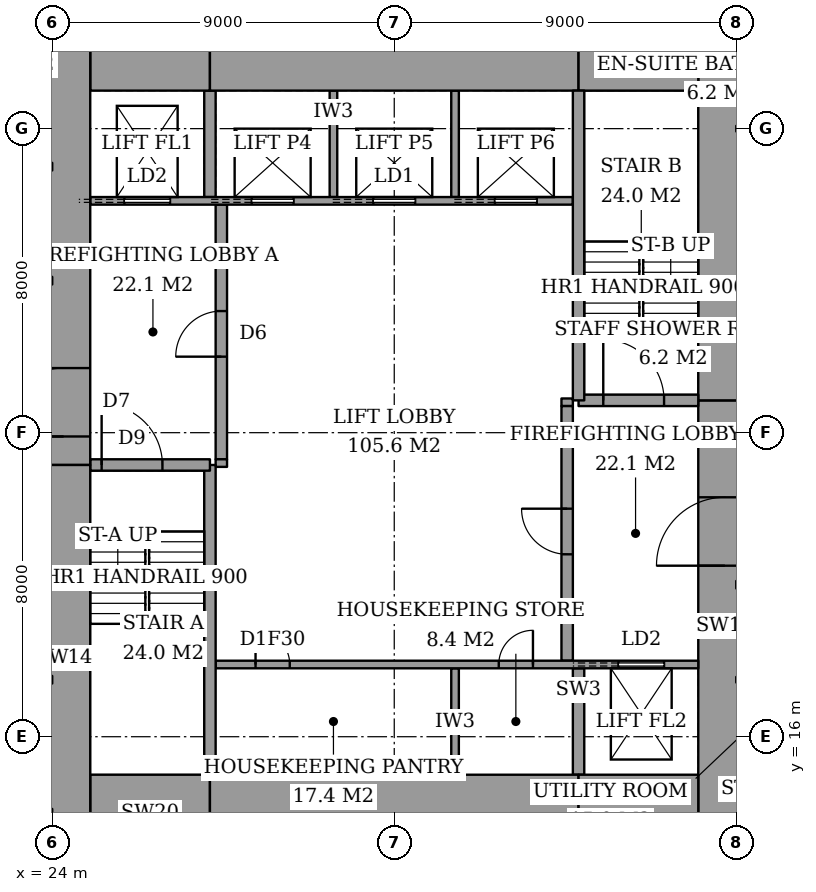
"""IFC4 building model, lengths in metres.
Left out: names, types, materials, properties, quantities, classifications, styles, units other than length and angle.
Written with IfcOpenShell. Run it as: python <this file> out.ifc"""

import sys

from ifc_helpers import new_model, si_unit, direction, frame, frame_2d, origin, place, context, subcontext, project, spatial, rectangle, extrude, element, fill, save


model = new_model("IFC4")
c1 = context("Model", 3, precision=1e-05, world=origin(), true_north=direction((0.0, 1.0)))
c2 = subcontext(c1, "Body", "Model", "MODEL_VIEW")
j1 = project(units=[si_unit("LENGTHUNIT", "METRE"), si_unit("PLANEANGLEUNIT", "RADIAN")], contexts=[c1])
p1 = place(None, origin())
s1 = spatial("IfcSite", under=j1, at=p1, CompositionType="ELEMENT")
p2 = place(p1, origin())
s2 = spatial("IfcBuilding", under=s1, at=p2, CompositionType="ELEMENT")
p3 = place(p2, frame((0.0, 0.0, 218.2)))
s3 = spatial("IfcBuildingStorey", under=s2, at=p3, CompositionType="ELEMENT", Elevation=218.2)
p4 = place(p3, frame((25.0, 14.0, 0.0), z_axis=(0.0, 0.0, 1.0), x_axis=(1.0, 0.0, 0.0)))
e1 = element("IfcWall", 1, at=p4, inside=s3, PredefinedType="SHEAR", context=c2, shape_type="SweptSolid", body=[
    extrude(rectangle(XDim=3.15, YDim=2.0, at=frame_2d((1.575, 0.0))), origin(), (0.0, 0.0, 1.0), 3.6),
])
p5 = place(p3, frame((28.15, 14.0, 0.0), z_axis=(0.0, 0.0, 1.0), x_axis=(1.0, 0.0, 0.0)))
e2 = element("IfcWall", 2, at=p5, inside=s3, PredefinedType="SHEAR", context=c2, shape_type="SweptSolid", body=[
    extrude(rectangle(XDim=9.7, YDim=2.0, at=frame_2d((4.85, 0.0))), origin(), (0.0, 0.0, 1.0), 3.6),
])
for number, where, z_axis, x_axis in (
    (3, (37.85, 14.0, 0.0), (0.0, 0.0, 1.0), (1.0, 0.0, 0.0)),
    (4, (25.0, 34.0, 0.0), (0.0, 0.0, 1.0), (1.0, 0.0, 0.0)),
):
    element("IfcWall", number, at=place(p3, frame(where, z_axis=z_axis, x_axis=x_axis)), inside=s3, PredefinedType="SHEAR", context=c2, shape_type="SweptSolid", body=[
        extrude(rectangle(XDim=3.15, YDim=2.0, at=frame_2d((1.575, 0.0))), origin(), (0.0, 0.0, 1.0), 3.6),
    ])
p6 = place(p3, frame((28.15, 34.0, 0.0), z_axis=(0.0, 0.0, 1.0), x_axis=(1.0, 0.0, 0.0)))
e5 = element("IfcWall", 5, at=p6, inside=s3, PredefinedType="SHEAR", context=c2, shape_type="SweptSolid", body=[
    extrude(rectangle(XDim=9.7, YDim=2.0, at=frame_2d((4.85, 0.0))), origin(), (0.0, 0.0, 1.0), 3.6),
])
p7 = place(p3, frame((37.85, 34.0, 0.0), z_axis=(0.0, 0.0, 1.0), x_axis=(1.0, 0.0, 0.0)))
e6 = element("IfcWall", 6, at=p7, inside=s3, PredefinedType="SHEAR", context=c2, shape_type="SweptSolid", body=[
    extrude(rectangle(XDim=3.15, YDim=2.0, at=frame_2d((1.575, 0.0))), origin(), (0.0, 0.0, 1.0), 3.6),
])
p8 = place(p3, frame((24.3, 13.0, 0.0), z_axis=(0.0, 0.0, 1.0), x_axis=(0.0, 1.0, 0.0)))
e7 = element("IfcWall", 7, at=p8, inside=s3, PredefinedType="SHEAR", context=c2, shape_type="SweptSolid", body=[
    extrude(rectangle(XDim=10.15, YDim=1.4, at=frame_2d((5.075, 0.0))), origin(), (0.0, 0.0, 1.0), 3.6),
])
p9 = place(p3, frame((24.3, 23.15, 0.0), z_axis=(0.0, 0.0, 1.0), x_axis=(0.0, 1.0, 0.0)))
e8 = element("IfcWall", 8, at=p9, inside=s3, PredefinedType="SHEAR", context=c2, shape_type="SweptSolid", body=[
    extrude(rectangle(XDim=11.85, YDim=1.4, at=frame_2d((5.925, 0.0))), origin(), (0.0, 0.0, 1.0), 3.6),
])
p10 = place(p9, frame((0.75, 0.0, 0.0)))
e9 = element("IfcOpeningElement", 9, at=p10, cuts=e8, PredefinedType="OPENING", context=c2, shape_type="SweptSolid", body=[
    extrude(rectangle(XDim=1.8, YDim=2.4, at=frame_2d((0.9, 1.2))), frame((0.0, 0.71, 0.0), z_axis=(0.0, -1.0, 0.0), x_axis=(1.0, 0.0, 0.0)), (0.0, 0.0, 1.0), 1.42),
])
p11 = place(p3, frame((41.7, 13.0, 0.0), z_axis=(0.0, 0.0, 1.0), x_axis=(0.0, 1.0, 0.0)))
e10 = element("IfcWall", 10, at=p11, inside=s3, PredefinedType="SHEAR", context=c2, shape_type="SweptSolid", body=[
    extrude(rectangle(XDim=11.85, YDim=1.4, at=frame_2d((5.925, 0.0))), origin(), (0.0, 0.0, 1.0), 3.6),
])
p12 = place(p11, frame((7.5, 0.0, 0.0)))
e11 = element("IfcOpeningElement", 11, at=p12, cuts=e10, PredefinedType="OPENING", context=c2, shape_type="SweptSolid", body=[
    extrude(rectangle(XDim=1.8, YDim=2.4, at=frame_2d((0.9, 1.2))), frame((0.0, 0.71, 0.0), z_axis=(0.0, -1.0, 0.0), x_axis=(1.0, 0.0, 0.0)), (0.0, 0.0, 1.0), 1.42),
])
p13 = place(p3, frame((41.7, 24.85, 0.0), z_axis=(0.0, 0.0, 1.0), x_axis=(0.0, 1.0, 0.0)))
e12 = element("IfcWall", 12, at=p13, inside=s3, PredefinedType="SHEAR", context=c2, shape_type="SweptSolid", body=[
    extrude(rectangle(XDim=10.15, YDim=1.4, at=frame_2d((5.075, 0.0))), origin(), (0.0, 0.0, 1.0), 3.6),
])
p14 = place(p3, frame((28.15, 15.0, 0.0), z_axis=(0.0, 0.0, 1.0), x_axis=(0.0, 1.0, 0.0)))
e13 = element("IfcWall", 13, at=p14, inside=s3, PredefinedType="SHEAR", context=c2, shape_type="SweptSolid", body=[
    extrude(rectangle(XDim=8.15, YDim=0.3, at=frame_2d((4.075, 0.0))), origin(), (0.0, 0.0, 1.0), 3.6),
])
p15 = place(p3, frame((25.0, 23.15, 0.0), z_axis=(0.0, 0.0, 1.0), x_axis=(1.0, 0.0, 0.0)))
e14 = element("IfcWall", 14, at=p15, inside=s3, PredefinedType="SHEAR", context=c2, shape_type="SweptSolid", body=[
    extrude(rectangle(XDim=3.15, YDim=0.3, at=frame_2d((1.575, 0.0))), origin(), (0.0, 0.0, 1.0), 3.6),
])
p16 = place(p15, frame((0.3, 0.0, 0.0)))
e15 = element("IfcOpeningElement", 15, at=p16, cuts=e14, PredefinedType="OPENING", context=c2, shape_type="SweptSolid", body=[
    extrude(rectangle(XDim=1.6, YDim=2.1, at=frame_2d((0.8, 1.05))), frame((0.0, 0.16, 0.0), z_axis=(0.0, -1.0, 0.0), x_axis=(1.0, 0.0, 0.0)), (0.0, 0.0, 1.0), 0.32),
])
p17 = place(p3, frame((37.85, 24.85, 0.0), z_axis=(0.0, 0.0, 1.0), x_axis=(0.0, 1.0, 0.0)))
e16 = element("IfcWall", 16, at=p17, inside=s3, PredefinedType="SHEAR", context=c2, shape_type="SweptSolid", body=[
    extrude(rectangle(XDim=8.15, YDim=0.3, at=frame_2d((4.075, 0.0))), origin(), (0.0, 0.0, 1.0), 3.6),
])
p18 = place(p3, frame((37.85, 24.85, 0.0), z_axis=(0.0, 0.0, 1.0), x_axis=(1.0, 0.0, 0.0)))
e17 = element("IfcWall", 17, at=p18, inside=s3, PredefinedType="SHEAR", context=c2, shape_type="SweptSolid", body=[
    extrude(rectangle(XDim=3.15, YDim=0.3, at=frame_2d((1.575, 0.0))), origin(), (0.0, 0.0, 1.0), 3.6),
])
p19 = place(p18, frame((0.65, 0.0, 0.0)))
e18 = element("IfcOpeningElement", 18, at=p19, cuts=e17, PredefinedType="OPENING", context=c2, shape_type="SweptSolid", body=[
    extrude(rectangle(XDim=1.6, YDim=2.1, at=frame_2d((0.8, 1.05))), frame((0.0, 0.16, 0.0), z_axis=(0.0, -1.0, 0.0), x_axis=(1.0, 0.0, 0.0)), (0.0, 0.0, 1.0), 0.32),
])
p20 = place(p3, frame((28.45, 23.3, 0.0), z_axis=(0.0, 0.0, 1.0), x_axis=(0.0, 1.0, 0.0)))
e19 = element("IfcWall", 19, at=p20, inside=s3, PredefinedType="PARTITIONING", context=c2, shape_type="SweptSolid", body=[
    extrude(rectangle(XDim=6.7, YDim=0.3, at=frame_2d((3.35, 0.0))), origin(), (0.0, 0.0, 1.0), 3.6),
])
p21 = place(p20, frame((2.7, 0.0, 0.0)))
e20 = element("IfcOpeningElement", 20, at=p21, cuts=e19, PredefinedType="OPENING", context=c2, shape_type="SweptSolid", body=[
    extrude(rectangle(XDim=1.2, YDim=2.1, at=frame_2d((0.6, 1.05))), frame((0.0, 0.16, 0.0), z_axis=(0.0, -1.0, 0.0), x_axis=(1.0, 0.0, 0.0)), (0.0, 0.0, 1.0), 0.32),
])
p22 = place(p3, frame((37.55, 18.0, 0.0), z_axis=(0.0, 0.0, 1.0), x_axis=(0.0, 1.0, 0.0)))
e21 = element("IfcWall", 21, at=p22, inside=s3, PredefinedType="PARTITIONING", context=c2, shape_type="SweptSolid", body=[
    extrude(rectangle(XDim=6.7, YDim=0.3, at=frame_2d((3.35, 0.0))), origin(), (0.0, 0.0, 1.0), 3.6),
])
p23 = place(p22, frame((2.8, 0.0, 0.0)))
e22 = element("IfcOpeningElement", 22, at=p23, cuts=e21, PredefinedType="OPENING", context=c2, shape_type="SweptSolid", body=[
    extrude(rectangle(XDim=1.2, YDim=2.1, at=frame_2d((0.6, 1.05))), frame((0.0, 0.16, 0.0), z_axis=(0.0, -1.0, 0.0), x_axis=(1.0, 0.0, 0.0)), (0.0, 0.0, 1.0), 0.32),
])
p24 = place(p3, frame((28.3, 17.9, 0.0), z_axis=(0.0, 0.0, 1.0), x_axis=(1.0, 0.0, 0.0)))
e23 = element("IfcWall", 23, at=p24, inside=s3, PredefinedType="PARTITIONING", context=c2, shape_type="SweptSolid", body=[
    extrude(rectangle(XDim=12.7, YDim=0.2, at=frame_2d((6.35, 0.0))), origin(), (0.0, 0.0, 1.0), 3.6),
])
p25 = place(p24, frame((1.05, 0.0, 0.0)))
e24 = element("IfcOpeningElement", 24, at=p25, cuts=e23, PredefinedType="OPENING", context=c2, shape_type="SweptSolid", body=[
    extrude(rectangle(XDim=0.9, YDim=2.1, at=frame_2d((0.45, 1.05))), frame((0.0, 0.11, 0.0), z_axis=(0.0, -1.0, 0.0), x_axis=(1.0, 0.0, 0.0)), (0.0, 0.0, 1.0), 0.22),
])
p26 = place(p24, frame((7.45, 0.0, 0.0)))
e25 = element("IfcOpeningElement", 25, at=p26, cuts=e23, PredefinedType="OPENING", context=c2, shape_type="SweptSolid", body=[
    extrude(rectangle(XDim=0.9, YDim=2.1, at=frame_2d((0.45, 1.05))), frame((0.0, 0.11, 0.0), z_axis=(0.0, -1.0, 0.0), x_axis=(1.0, 0.0, 0.0)), (0.0, 0.0, 1.0), 0.22),
])
p27 = place(p24, frame((10.6, 0.0, 0.0)))
e26 = element("IfcOpeningElement", 26, at=p27, cuts=e23, PredefinedType="OPENING", context=c2, shape_type="SweptSolid", body=[
    extrude(rectangle(XDim=1.2, YDim=2.1, at=frame_2d((0.6, 1.05))), frame((0.0, 0.11, 0.0), z_axis=(0.0, -1.0, 0.0), x_axis=(1.0, 0.0, 0.0)), (0.0, 0.0, 1.0), 0.22),
])
p28 = place(p3, frame((25.0, 30.1, 0.0), z_axis=(0.0, 0.0, 1.0), x_axis=(1.0, 0.0, 0.0)))
e27 = element("IfcWall", 27, at=p28, inside=s3, PredefinedType="PARTITIONING", context=c2, shape_type="SweptSolid", body=[
    extrude(rectangle(XDim=12.7, YDim=0.2, at=frame_2d((6.35, 0.0))), origin(), (0.0, 0.0, 1.0), 3.6),
])
p29 = place(p28, frame((4.25, 0.0, 0.0)))
e28 = element("IfcOpeningElement", 28, at=p29, cuts=e27, PredefinedType="OPENING", context=c2, shape_type="SweptSolid", body=[
    extrude(rectangle(XDim=1.1, YDim=2.1, at=frame_2d((0.55, 1.05))), frame((0.0, 0.11, 0.0), z_axis=(0.0, -1.0, 0.0), x_axis=(1.0, 0.0, 0.0)), (0.0, 0.0, 1.0), 0.22),
])
p30 = place(p28, frame((7.45, 0.0, 0.0)))
e29 = element("IfcOpeningElement", 29, at=p30, cuts=e27, PredefinedType="OPENING", context=c2, shape_type="SweptSolid", body=[
    extrude(rectangle(XDim=1.1, YDim=2.1, at=frame_2d((0.55, 1.05))), frame((0.0, 0.11, 0.0), z_axis=(0.0, -1.0, 0.0), x_axis=(1.0, 0.0, 0.0)), (0.0, 0.0, 1.0), 0.22),
])
p31 = place(p28, frame((10.65, 0.0, 0.0)))
e30 = element("IfcOpeningElement", 30, at=p31, cuts=e27, PredefinedType="OPENING", context=c2, shape_type="SweptSolid", body=[
    extrude(rectangle(XDim=1.1, YDim=2.1, at=frame_2d((0.55, 1.05))), frame((0.0, 0.11, 0.0), z_axis=(0.0, -1.0, 0.0), x_axis=(1.0, 0.0, 0.0)), (0.0, 0.0, 1.0), 0.22),
])
p32 = place(p28, frame((0.9, 0.0, 0.0)))
e31 = element("IfcOpeningElement", 31, at=p32, cuts=e27, PredefinedType="OPENING", context=c2, shape_type="SweptSolid", body=[
    extrude(rectangle(XDim=1.2, YDim=2.1, at=frame_2d((0.6, 1.05))), frame((0.0, 0.11, 0.0), z_axis=(0.0, -1.0, 0.0), x_axis=(1.0, 0.0, 0.0)), (0.0, 0.0, 1.0), 0.22),
])
p33 = place(p3, frame((34.6, 15.0, 0.0), z_axis=(0.0, 0.0, 1.0), x_axis=(0.0, 1.0, 0.0)))
e32 = element("IfcWall", 32, at=p33, inside=s3, PredefinedType="PARTITIONING", context=c2, shape_type="SweptSolid", body=[
    extrude(rectangle(XDim=2.8, YDim=0.2, at=frame_2d((1.4, 0.0))), origin(), (0.0, 0.0, 1.0), 3.6),
])
p34 = place(p3, frame((37.85, 15.0, 0.0), z_axis=(0.0, 0.0, 1.0), x_axis=(0.0, 1.0, 0.0)))
e33 = element("IfcWall", 33, at=p34, inside=s3, PredefinedType="SHEAR", context=c2, shape_type="SweptSolid", body=[
    extrude(rectangle(XDim=2.8, YDim=0.3, at=frame_2d((1.4, 0.0))), origin(), (0.0, 0.0, 1.0), 3.6),
])
for number, where, z_axis, x_axis in (
    (34, (31.4, 30.2, 0.0), (0.0, 0.0, 1.0), (0.0, 1.0, 0.0)),
    (35, (34.6, 30.2, 0.0), (0.0, 0.0, 1.0), (0.0, 1.0, 0.0)),
):
    element("IfcWall", number, at=place(p3, frame(where, z_axis=z_axis, x_axis=x_axis)), inside=s3, PredefinedType="PARTITIONING", context=c2, shape_type="SweptSolid", body=[
        extrude(rectangle(XDim=2.8, YDim=0.2, at=frame_2d((1.4, 0.0))), origin(), (0.0, 0.0, 1.0), 3.6),
    ])
p35 = place(p3, frame((28.15, 30.2, 0.0), z_axis=(0.0, 0.0, 1.0), x_axis=(0.0, 1.0, 0.0)))
e36 = element("IfcWall", 36, at=p35, inside=s3, PredefinedType="SHEAR", context=c2, shape_type="SweptSolid", body=[
    extrude(rectangle(XDim=2.8, YDim=0.3, at=frame_2d((1.4, 0.0))), origin(), (0.0, 0.0, 1.0), 3.6),
])
for number, where, z_axis, x_axis in (
    (37, (28.3, 23.2, 0.0), (0.0, 0.0, 1.0), (1.0, 0.0, 0.0)),
    (38, (37.4, 24.8, 0.0), (0.0, 0.0, 1.0), (1.0, 0.0, 0.0)),
):
    element("IfcWall", number, at=place(p3, frame(where, z_axis=z_axis, x_axis=x_axis)), inside=s3, PredefinedType="PARTITIONING", context=c2, shape_type="SweptSolid", body=[
        extrude(rectangle(XDim=0.3, YDim=0.2, at=frame_2d((0.15, 0.0))), origin(), (0.0, 0.0, 1.0), 3.6),
    ])
p36 = place(p16, origin())
e39 = element("IfcDoor", 39, at=p36, inside=s3, OperationType="DOUBLE_DOOR_SINGLE_SWING", PredefinedType="DOOR", context=c2, shape_type="SweptSolid", body=[
    extrude(rectangle(XDim=1.6, YDim=2.1, at=frame_2d((0.8, 1.05))), frame((0.0, 0.025, 0.0), z_axis=(0.0, -1.0, 0.0), x_axis=(1.0, 0.0, 0.0)), (0.0, 0.0, 1.0), 0.05),
])
fill(e15, e39)
p37 = place(p19, origin())
e40 = element("IfcDoor", 40, at=p37, inside=s3, OperationType="DOUBLE_DOOR_SINGLE_SWING", PredefinedType="DOOR", context=c2, shape_type="SweptSolid", body=[
    extrude(rectangle(XDim=1.6, YDim=2.1, at=frame_2d((0.8, 1.05))), frame((0.0, 0.025, 0.0), z_axis=(0.0, -1.0, 0.0), x_axis=(1.0, 0.0, 0.0)), (0.0, 0.0, 1.0), 0.05),
])
fill(e18, e40)
p38 = place(p21, origin())
e41 = element("IfcDoor", 41, at=p38, inside=s3, OperationType="SINGLE_SWING_RIGHT", PredefinedType="DOOR", context=c2, shape_type="SweptSolid", body=[
    extrude(rectangle(XDim=1.2, YDim=2.1, at=frame_2d((0.6, 1.05))), frame((0.0, 0.025, 0.0), z_axis=(0.0, -1.0, 0.0), x_axis=(1.0, 0.0, 0.0)), (0.0, 0.0, 1.0), 0.05),
])
fill(e20, e41)
p39 = place(p23, origin())
e42 = element("IfcDoor", 42, at=p39, inside=s3, OperationType="SINGLE_SWING_LEFT", PredefinedType="DOOR", context=c2, shape_type="SweptSolid", body=[
    extrude(rectangle(XDim=1.2, YDim=2.1, at=frame_2d((0.6, 1.05))), frame((0.0, 0.025, 0.0), z_axis=(0.0, -1.0, 0.0), x_axis=(1.0, 0.0, 0.0)), (0.0, 0.0, 1.0), 0.05),
])
fill(e22, e42)
p40 = place(p10, origin())
e43 = element("IfcDoor", 43, at=p40, inside=s3, OperationType="DOUBLE_DOOR_DOUBLE_SWING", PredefinedType="DOOR", context=c2, shape_type="SweptSolid", body=[
    extrude(rectangle(XDim=1.8, YDim=2.4, at=frame_2d((0.9, 1.2))), frame((0.0, 0.025, 0.0), z_axis=(0.0, -1.0, 0.0), x_axis=(1.0, 0.0, 0.0)), (0.0, 0.0, 1.0), 0.05),
])
fill(e9, e43)
p41 = place(p12, origin())
e44 = element("IfcDoor", 44, at=p41, inside=s3, OperationType="DOUBLE_DOOR_DOUBLE_SWING", PredefinedType="DOOR", context=c2, shape_type="SweptSolid", body=[
    extrude(rectangle(XDim=1.8, YDim=2.4, at=frame_2d((0.9, 1.2))), frame((0.0, 0.025, 0.0), z_axis=(0.0, -1.0, 0.0), x_axis=(1.0, 0.0, 0.0)), (0.0, 0.0, 1.0), 0.05),
])
fill(e11, e44)
p42 = place(p25, origin())
e45 = element("IfcDoor", 45, at=p42, inside=s3, OperationType="SINGLE_SWING_RIGHT", PredefinedType="DOOR", context=c2, shape_type="SweptSolid", body=[
    extrude(rectangle(XDim=0.9, YDim=2.1, at=frame_2d((0.45, 1.05))), frame((0.0, 0.025, 0.0), z_axis=(0.0, -1.0, 0.0), x_axis=(1.0, 0.0, 0.0)), (0.0, 0.0, 1.0), 0.05),
])
fill(e24, e45)
p43 = place(p26, origin())
e46 = element("IfcDoor", 46, at=p43, inside=s3, OperationType="SINGLE_SWING_LEFT", PredefinedType="DOOR", context=c2, shape_type="SweptSolid", body=[
    extrude(rectangle(XDim=0.9, YDim=2.1, at=frame_2d((0.45, 1.05))), frame((0.0, 0.025, 0.0), z_axis=(0.0, -1.0, 0.0), x_axis=(1.0, 0.0, 0.0)), (0.0, 0.0, 1.0), 0.05),
])
fill(e25, e46)
p44 = place(p29, origin())
e47 = element("IfcDoor", 47, at=p44, inside=s3, OperationType="SLIDING_TO_LEFT", PredefinedType="DOOR", context=c2, shape_type="SweptSolid", body=[
    extrude(rectangle(XDim=1.1, YDim=2.1, at=frame_2d((0.55, 1.05))), frame((0.0, 0.025, 0.0), z_axis=(0.0, -1.0, 0.0), x_axis=(1.0, 0.0, 0.0)), (0.0, 0.0, 1.0), 0.05),
])
fill(e28, e47)
p45 = place(p30, origin())
e48 = element("IfcDoor", 48, at=p45, inside=s3, OperationType="SLIDING_TO_LEFT", PredefinedType="DOOR", context=c2, shape_type="SweptSolid", body=[
    extrude(rectangle(XDim=1.1, YDim=2.1, at=frame_2d((0.55, 1.05))), frame((0.0, 0.025, 0.0), z_axis=(0.0, -1.0, 0.0), x_axis=(1.0, 0.0, 0.0)), (0.0, 0.0, 1.0), 0.05),
])
fill(e29, e48)
p46 = place(p31, origin())
e49 = element("IfcDoor", 49, at=p46, inside=s3, OperationType="SLIDING_TO_LEFT", PredefinedType="DOOR", context=c2, shape_type="SweptSolid", body=[
    extrude(rectangle(XDim=1.1, YDim=2.1, at=frame_2d((0.55, 1.05))), frame((0.0, 0.025, 0.0), z_axis=(0.0, -1.0, 0.0), x_axis=(1.0, 0.0, 0.0)), (0.0, 0.0, 1.0), 0.05),
])
fill(e30, e49)
p47 = place(p32, origin())
e50 = element("IfcDoor", 50, at=p47, inside=s3, OperationType="SLIDING_TO_LEFT", PredefinedType="DOOR", context=c2, shape_type="SweptSolid", body=[
    extrude(rectangle(XDim=1.2, YDim=2.1, at=frame_2d((0.6, 1.05))), frame((0.0, 0.025, 0.0), z_axis=(0.0, -1.0, 0.0), x_axis=(1.0, 0.0, 0.0)), (0.0, 0.0, 1.0), 0.05),
])
fill(e31, e50)
p48 = place(p27, origin())
e51 = element("IfcDoor", 51, at=p48, inside=s3, OperationType="SLIDING_TO_LEFT", PredefinedType="DOOR", context=c2, shape_type="SweptSolid", body=[
    extrude(rectangle(XDim=1.2, YDim=2.1, at=frame_2d((0.6, 1.05))), frame((0.0, 0.025, 0.0), z_axis=(0.0, -1.0, 0.0), x_axis=(1.0, 0.0, 0.0)), (0.0, 0.0, 1.0), 0.05),
])
fill(e26, e51)
save(model, sys.argv[1])
